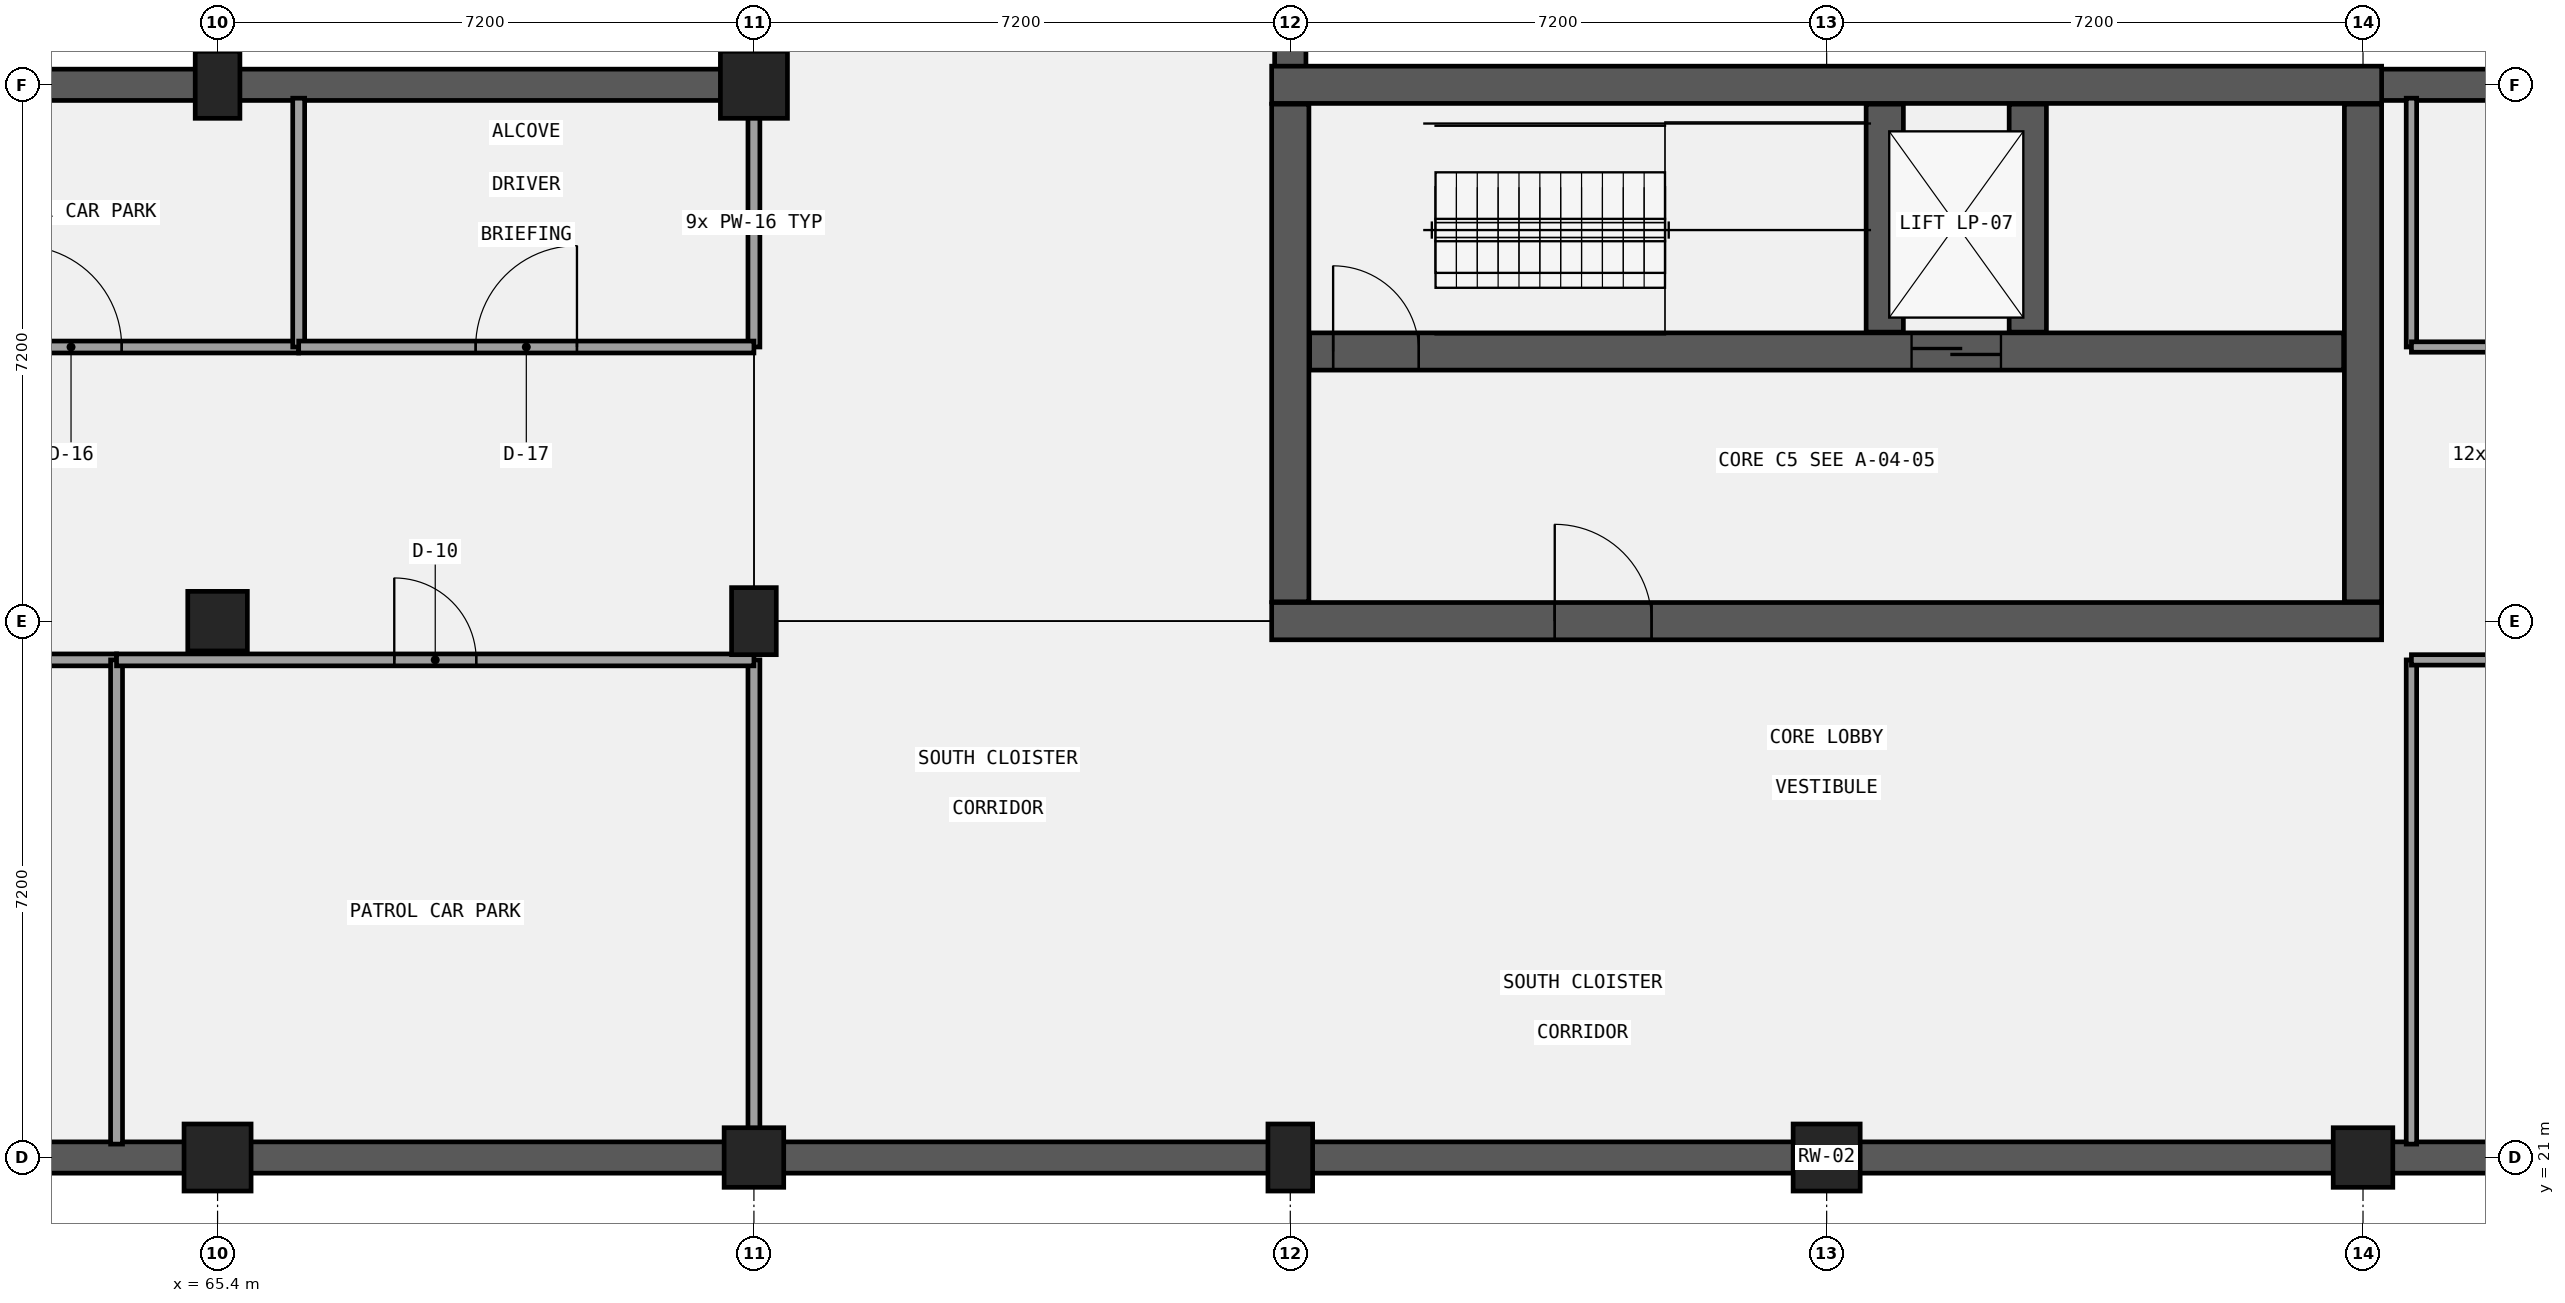
"""IFC4 building model, lengths in metres.
Left out: names, types, materials, properties, quantities, classifications, styles, units other than length and angle.
Written with IfcOpenShell. Run it as: python <this file> out.ifc"""

import sys

from ifc_helpers import new_model, si_unit, direction, frame, frame_2d, origin, origin_2d, place, context, subcontext, project, spatial, rectangle, extrude, element, fill, save


model = new_model("IFC4")
c1 = context("Model", 3, precision=1e-05, world=origin(), true_north=direction((0.0, 1.0)))
c2 = subcontext(c1, "Body", "Model", "MODEL_VIEW")
j1 = project(units=[si_unit("LENGTHUNIT", "METRE"), si_unit("PLANEANGLEUNIT", "RADIAN")], contexts=[c1])
p1 = place(None, origin())
s1 = spatial("IfcSite", under=j1, at=p1, CompositionType="ELEMENT")
p2 = place(p1, origin())
s2 = spatial("IfcBuilding", under=s1, at=p2, CompositionType="ELEMENT")
p3 = place(p2, frame((0.0, 0.0, -4.2)))
s3 = spatial("IfcBuildingStorey", under=s2, at=p3, CompositionType="ELEMENT", Elevation=-4.2)
p4 = place(p3, frame((144.81, 21.0, 0.0), z_axis=(0.0, 0.0, 1.0), x_axis=(-1.0, 0.0, 0.0)))
e1 = element("IfcWall", 1, at=p4, inside=s3, PredefinedType="USERDEFINED", context=c2, shape_type="SweptSolid", body=[
    extrude(rectangle(XDim=115.62, YDim=0.42, at=frame_2d((57.81, 0.0))), origin(), (0.0, 0.0, 1.0), 2.88),
])
p5 = place(p3, frame((29.19, 35.4, 0.0), z_axis=(0.0, 0.0, 1.0), x_axis=(1.0, 0.0, 0.0)))
e2 = element("IfcWall", 2, at=p5, inside=s3, PredefinedType="USERDEFINED", context=c2, shape_type="SweptSolid", body=[
    extrude(rectangle(XDim=43.62, YDim=0.42, at=frame_2d((21.81, 0.0))), origin(), (0.0, 0.0, 1.0), 3.03),
])
p6 = place(p3, frame((72.6, 35.6, 0.0), z_axis=(0.0, 0.0, 1.0), x_axis=(0.0, 1.0, 0.0)))
e3 = element("IfcWall", 3, at=p6, inside=s3, PredefinedType="USERDEFINED", context=c2, shape_type="SweptSolid", body=[
    extrude(rectangle(XDim=42.8, YDim=0.42, at=frame_2d((21.4, 0.0))), origin(), (0.0, 0.0, 1.0), 3.03),
])
p7 = place(p3, frame((94.43, 35.4, 0.0), z_axis=(0.0, 0.0, 1.0), x_axis=(1.0, 0.0, 0.0)))
e4 = element("IfcWall", 4, at=p7, inside=s3, PredefinedType="USERDEFINED", context=c2, shape_type="SweptSolid", body=[
    extrude(rectangle(XDim=50.38, YDim=0.42, at=frame_2d((25.19, 0.0))), origin(), (0.0, 0.0, 1.0), 2.98),
])
p8 = place(p3, frame((79.8, 78.4, 0.0), z_axis=(0.0, 0.0, 1.0), x_axis=(0.0, -1.0, 0.0)))
e5 = element("IfcWall", 5, at=p8, inside=s3, PredefinedType="USERDEFINED", context=c2, shape_type="SweptSolid", body=[
    extrude(rectangle(XDim=42.77, YDim=0.42, at=frame_2d((21.385, 0.0))), origin(), (0.0, 0.0, 1.0), 3.88),
])
p9 = place(p3, frame((79.55, 35.4, 0.0), z_axis=(0.0, 0.0, 1.0), x_axis=(1.0, 0.0, 0.0)))
e6 = element("IfcWall", 6, at=p9, inside=s3, PredefinedType="SHEAR", context=c2, shape_type="SweptSolid", body=[
    extrude(rectangle(XDim=14.9, YDim=0.5, at=frame_2d((7.45, 0.0))), origin(), (0.0, 0.0, 1.0), 4.2),
])
p10 = place(p3, frame((79.55, 28.2, 0.0), z_axis=(0.0, 0.0, 1.0), x_axis=(1.0, 0.0, 0.0)))
e7 = element("IfcWall", 7, at=p10, inside=s3, PredefinedType="SHEAR", context=c2, shape_type="SweptSolid", body=[
    extrude(rectangle(XDim=14.9, YDim=0.5, at=frame_2d((7.45, 0.0))), origin(), (0.0, 0.0, 1.0), 4.2),
])
p11 = place(p10, frame((3.8, 0.0, 0.0)))
e8 = element("IfcOpeningElement", 8, at=p11, cuts=e7, PredefinedType="OPENING", context=c2, shape_type="SweptSolid", body=[
    extrude(rectangle(XDim=1.3, YDim=2.2, at=frame_2d((0.65, 1.1))), frame((0.0, 0.26, 0.0), z_axis=(0.0, -1.0, 0.0), x_axis=(1.0, 0.0, 0.0)), (0.0, 0.0, 1.0), 0.52),
])
for number, where, z_axis, x_axis in (
    (9, (79.8, 28.46, 0.0), (0.0, 0.0, 1.0), (0.0, 1.0, 0.0)),
    (10, (94.2, 28.46, 0.0), (0.0, 0.0, 1.0), (0.0, 1.0, 0.0)),
):
    element("IfcWall", number, at=place(p3, frame(where, z_axis=z_axis, x_axis=x_axis)), inside=s3, PredefinedType="SHEAR", context=c2, shape_type="SweptSolid", body=[
        extrude(rectangle(XDim=6.68, YDim=0.5, at=frame_2d((3.34, 0.0))), origin(), (0.0, 0.0, 1.0), 4.2),
    ])
p12 = place(p3, frame((80.06, 31.82, 0.0), z_axis=(0.0, 0.0, 1.0), x_axis=(1.0, 0.0, 0.0)))
e11 = element("IfcWall", 11, at=p12, inside=s3, PredefinedType="SHEAR", context=c2, shape_type="SweptSolid", body=[
    extrude(rectangle(XDim=13.88, YDim=0.5, at=frame_2d((6.94, 0.0))), origin(), (0.0, 0.0, 1.0), 4.2),
])
p13 = place(p12, frame((8.08, 0.0, 0.0)))
e12 = element("IfcOpeningElement", 12, at=p13, cuts=e11, PredefinedType="OPENING", context=c2, shape_type="SweptSolid", body=[
    extrude(rectangle(XDim=1.2, YDim=2.15, at=frame_2d((0.6, 1.075))), frame((0.0, 0.26, 0.0), z_axis=(0.0, -1.0, 0.0), x_axis=(1.0, 0.0, 0.0)), (0.0, 0.0, 1.0), 0.52),
])
p14 = place(p12, frame((0.315, 0.0, 0.0)))
e13 = element("IfcOpeningElement", 13, at=p14, cuts=e11, PredefinedType="OPENING", context=c2, shape_type="SweptSolid", body=[
    extrude(rectangle(XDim=1.15, YDim=2.15, at=frame_2d((0.575, 1.075))), frame((0.0, 0.26, 0.0), z_axis=(0.0, -1.0, 0.0), x_axis=(1.0, 0.0, 0.0)), (0.0, 0.0, 1.0), 0.52),
])
for number, where, z_axis, x_axis in (
    (14, (87.78, 32.08, 0.0), (0.0, 0.0, 1.0), (0.0, 1.0, 0.0)),
    (15, (89.7, 32.08, 0.0), (0.0, 0.0, 1.0), (0.0, 1.0, 0.0)),
):
    element("IfcWall", number, at=place(p3, frame(where, z_axis=z_axis, x_axis=x_axis)), inside=s3, PredefinedType="SHEAR", context=c2, shape_type="SweptSolid", body=[
        extrude(rectangle(XDim=3.06, YDim=0.5, at=frame_2d((1.53, 0.0))), origin(), (0.0, 0.0, 1.0), 4.2),
    ])
p15 = place(p3, frame((65.4, 21.0, 0.0), z_axis=(0.0, 0.0, 1.0), x_axis=(1.0, 0.0, 0.0)))
e16 = element("IfcColumn", 16, at=p15, inside=s3, PredefinedType="COLUMN", context=c2, shape_type="SweptSolid", body=[
    extrude(rectangle(XDim=0.9, YDim=0.9, at=origin_2d()), origin(), (0.0, 0.0, 1.0), 4.2),
])
p16 = place(p3, frame((65.4, 28.2, 0.0), z_axis=(0.0, 0.0, 1.0), x_axis=(1.0, 0.0, 0.0)))
e17 = element("IfcColumn", 17, at=p16, inside=s3, PredefinedType="COLUMN", context=c2, shape_type="SweptSolid", body=[
    extrude(rectangle(XDim=0.8, YDim=0.8, at=origin_2d()), origin(), (0.0, 0.0, 1.0), 4.2),
])
p17 = place(p3, frame((65.4, 35.4, 0.0), z_axis=(0.0, 0.0, 1.0), x_axis=(1.0, 0.0, 0.0)))
e18 = element("IfcColumn", 18, at=p17, inside=s3, PredefinedType="COLUMN", context=c2, shape_type="SweptSolid", body=[
    extrude(rectangle(XDim=0.6, YDim=0.9, at=origin_2d()), origin(), (0.0, 0.0, 1.0), 4.2),
])
p18 = place(p3, frame((72.6, 21.0, 0.0), z_axis=(0.0, 0.0, 1.0), x_axis=(1.0, 0.0, 0.0)))
e19 = element("IfcColumn", 19, at=p18, inside=s3, PredefinedType="COLUMN", context=c2, shape_type="SweptSolid", body=[
    extrude(rectangle(XDim=0.8, YDim=0.8, at=origin_2d()), origin(), (0.0, 0.0, 1.0), 4.2),
])
p19 = place(p3, frame((72.6, 28.2, 0.0), z_axis=(0.0, 0.0, 1.0), x_axis=(1.0, 0.0, 0.0)))
e20 = element("IfcColumn", 20, at=p19, inside=s3, PredefinedType="COLUMN", context=c2, shape_type="SweptSolid", body=[
    extrude(rectangle(XDim=0.6, YDim=0.9, at=origin_2d()), origin(), (0.0, 0.0, 1.0), 4.2),
])
p20 = place(p3, frame((72.6, 35.4, 0.0), z_axis=(0.0, 0.0, 1.0), x_axis=(1.0, 0.0, 0.0)))
e21 = element("IfcColumn", 21, at=p20, inside=s3, PredefinedType="COLUMN", context=c2, shape_type="SweptSolid", body=[
    extrude(rectangle(XDim=0.9, YDim=0.9, at=origin_2d()), origin(), (0.0, 0.0, 1.0), 4.2),
])
p21 = place(p3, frame((79.8, 21.0, 0.0), z_axis=(0.0, 0.0, 1.0), x_axis=(1.0, 0.0, 0.0)))
e22 = element("IfcColumn", 22, at=p21, inside=s3, PredefinedType="COLUMN", context=c2, shape_type="SweptSolid", body=[
    extrude(rectangle(XDim=0.6, YDim=0.9, at=origin_2d()), origin(), (0.0, 0.0, 1.0), 4.2),
])
p22 = place(p3, frame((87.0, 21.0, 0.0), z_axis=(0.0, 0.0, 1.0), x_axis=(1.0, 0.0, 0.0)))
e23 = element("IfcColumn", 23, at=p22, inside=s3, PredefinedType="COLUMN", context=c2, shape_type="SweptSolid", body=[
    extrude(rectangle(XDim=0.9, YDim=0.9, at=origin_2d()), origin(), (0.0, 0.0, 1.0), 4.2),
])
p23 = place(p3, frame((94.2, 21.0, 0.0), z_axis=(0.0, 0.0, 1.0), x_axis=(1.0, 0.0, 0.0)))
e24 = element("IfcColumn", 24, at=p23, inside=s3, PredefinedType="COLUMN", context=c2, shape_type="SweptSolid", body=[
    extrude(rectangle(XDim=0.8, YDim=0.8, at=origin_2d()), origin(), (0.0, 0.0, 1.0), 4.2),
])
p24 = place(p3, frame((94.85, 21.18, 0.0), z_axis=(0.0, 0.0, 1.0), x_axis=(0.0, 1.0, 0.0)))
e25 = element("IfcWall", 25, at=p24, inside=s3, PredefinedType="PARTITIONING", context=c2, shape_type="SweptSolid", body=[
    extrude(rectangle(XDim=6.5, YDim=0.14, at=frame_2d((3.25, 0.0))), origin(), (0.0, 0.0, 1.0), 3.88),
])
p25 = place(p3, frame((94.85, 27.68, 0.0), z_axis=(0.0, 0.0, 1.0), x_axis=(1.0, 0.0, 0.0)))
e26 = element("IfcWall", 26, at=p25, inside=s3, PredefinedType="PARTITIONING", context=c2, shape_type="SweptSolid", body=[
    extrude(rectangle(XDim=9.866, YDim=0.14, at=frame_2d((4.933, 0.0))), origin(), (0.0, 0.0, 1.0), 3.88),
])
p26 = place(p25, frame((2.773, 0.0, 0.0)))
e27 = element("IfcOpeningElement", 27, at=p26, cuts=e26, PredefinedType="OPENING", context=c2, shape_type="SweptSolid", body=[
    extrude(rectangle(XDim=1.36, YDim=2.22, at=frame_2d((0.68, 1.11))), frame((0.0, 0.08, 0.0), z_axis=(0.0, -1.0, 0.0), x_axis=(1.0, 0.0, 0.0)), (0.0, 0.0, 1.0), 0.16),
])
p27 = place(p3, frame((94.85, 31.88, 0.0), z_axis=(0.0, 0.0, 1.0), x_axis=(0.0, 1.0, 0.0)))
e28 = element("IfcWall", 28, at=p27, inside=s3, PredefinedType="PARTITIONING", context=c2, shape_type="SweptSolid", body=[
    extrude(rectangle(XDim=3.34, YDim=0.14, at=frame_2d((1.67, 0.0))), origin(), (0.0, 0.0, 1.0), 3.88),
])
p28 = place(p3, frame((94.85, 31.88, 0.0), z_axis=(0.0, 0.0, 1.0), x_axis=(1.0, 0.0, 0.0)))
e29 = element("IfcWall", 29, at=p28, inside=s3, PredefinedType="PARTITIONING", context=c2, shape_type="SweptSolid", body=[
    extrude(rectangle(XDim=6.166, YDim=0.14, at=frame_2d((3.083, 0.0))), origin(), (0.0, 0.0, 1.0), 3.88),
])
p29 = place(p28, frame((2.223, 0.0, 0.0)))
e30 = element("IfcOpeningElement", 30, at=p29, cuts=e29, PredefinedType="OPENING", context=c2, shape_type="SweptSolid", body=[
    extrude(rectangle(XDim=1.72, YDim=2.1, at=frame_2d((0.86, 1.05))), frame((0.0, 0.08, 0.0), z_axis=(0.0, -1.0, 0.0), x_axis=(1.0, 0.0, 0.0)), (0.0, 0.0, 1.0), 0.16),
])
p30 = place(p3, frame((72.6, 21.18, 0.0), z_axis=(0.0, 0.0, 1.0), x_axis=(0.0, 1.0, 0.0)))
e31 = element("IfcWall", 31, at=p30, inside=s3, PredefinedType="PARTITIONING", context=c2, shape_type="SweptSolid", body=[
    extrude(rectangle(XDim=6.5, YDim=0.16, at=frame_2d((3.25, 0.0))), origin(), (0.0, 0.0, 1.0), 2.88),
])
p31 = place(p3, frame((55.488, 27.68, 0.0), z_axis=(0.0, 0.0, 1.0), x_axis=(1.0, 0.0, 0.0)))
e32 = element("IfcWall", 32, at=p31, inside=s3, PredefinedType="PARTITIONING", context=c2, shape_type="SweptSolid", body=[
    extrude(rectangle(XDim=8.556, YDim=0.16, at=frame_2d((4.278, 0.0))), origin(), (0.0, 0.0, 1.0), 3.88),
])
p32 = place(p31, frame((5.042, 0.0, 0.0)))
e33 = element("IfcOpeningElement", 33, at=p32, cuts=e32, PredefinedType="OPENING", context=c2, shape_type="SweptSolid", body=[
    extrude(rectangle(XDim=1.04, YDim=2.35, at=frame_2d((0.52, 1.175))), frame((0.0, 0.09, 0.0), z_axis=(0.0, -1.0, 0.0), x_axis=(1.0, 0.0, 0.0)), (0.0, 0.0, 1.0), 0.18),
])
p33 = place(p3, frame((64.044, 21.18, 0.0), z_axis=(0.0, 0.0, 1.0), x_axis=(0.0, 1.0, 0.0)))
e34 = element("IfcWall", 34, at=p33, inside=s3, PredefinedType="PARTITIONING", context=c2, shape_type="SweptSolid", body=[
    extrude(rectangle(XDim=6.5, YDim=0.16, at=frame_2d((3.25, 0.0))), origin(), (0.0, 0.0, 1.0), 3.88),
])
p34 = place(p3, frame((64.044, 27.68, 0.0), z_axis=(0.0, 0.0, 1.0), x_axis=(1.0, 0.0, 0.0)))
e35 = element("IfcWall", 35, at=p34, inside=s3, PredefinedType="PARTITIONING", context=c2, shape_type="SweptSolid", body=[
    extrude(rectangle(XDim=8.556, YDim=0.16, at=frame_2d((4.278, 0.0))), origin(), (0.0, 0.0, 1.0), 3.88),
])
p35 = place(p34, frame((3.728, 0.0, 0.0)))
e36 = element("IfcOpeningElement", 36, at=p35, cuts=e35, PredefinedType="OPENING", context=c2, shape_type="SweptSolid", body=[
    extrude(rectangle(XDim=1.1, YDim=2.1, at=frame_2d((0.55, 1.05))), frame((0.0, 0.09, 0.0), z_axis=(0.0, -1.0, 0.0), x_axis=(1.0, 0.0, 0.0)), (0.0, 0.0, 1.0), 0.18),
])
p36 = place(p3, frame((72.6, 31.88, 0.0), z_axis=(0.0, 0.0, 1.0), x_axis=(0.0, 1.0, 0.0)))
e37 = element("IfcWall", 37, at=p36, inside=s3, PredefinedType="PARTITIONING", context=c2, shape_type="SweptSolid", body=[
    extrude(rectangle(XDim=3.34, YDim=0.16, at=frame_2d((1.67, 0.0))), origin(), (0.0, 0.0, 1.0), 3.33),
])
p37 = place(p3, frame((60.377, 31.88, 0.0), z_axis=(0.0, 0.0, 1.0), x_axis=(1.0, 0.0, 0.0)))
e38 = element("IfcWall", 38, at=p37, inside=s3, PredefinedType="PARTITIONING", context=c2, shape_type="SweptSolid", body=[
    extrude(rectangle(XDim=6.112, YDim=0.16, at=frame_2d((3.056, 0.0))), origin(), (0.0, 0.0, 1.0), 3.33),
])
p38 = place(p37, frame((2.376, 0.0, 0.0)))
e39 = element("IfcOpeningElement", 39, at=p38, cuts=e38, PredefinedType="OPENING", context=c2, shape_type="SweptSolid", body=[
    extrude(rectangle(XDim=1.36, YDim=2.1, at=frame_2d((0.68, 1.05))), frame((0.0, 0.09, 0.0), z_axis=(0.0, -1.0, 0.0), x_axis=(1.0, 0.0, 0.0)), (0.0, 0.0, 1.0), 0.18),
])
p39 = place(p3, frame((66.489, 31.88, 0.0), z_axis=(0.0, 0.0, 1.0), x_axis=(0.0, 1.0, 0.0)))
e40 = element("IfcWall", 40, at=p39, inside=s3, PredefinedType="PARTITIONING", context=c2, shape_type="SweptSolid", body=[
    extrude(rectangle(XDim=3.34, YDim=0.16, at=frame_2d((1.67, 0.0))), origin(), (0.0, 0.0, 1.0), 3.88),
])
p40 = place(p3, frame((66.489, 31.88, 0.0), z_axis=(0.0, 0.0, 1.0), x_axis=(1.0, 0.0, 0.0)))
e41 = element("IfcWall", 41, at=p40, inside=s3, PredefinedType="PARTITIONING", context=c2, shape_type="SweptSolid", body=[
    extrude(rectangle(XDim=6.111, YDim=0.16, at=frame_2d((3.056, 0.0))), origin(), (0.0, 0.0, 1.0), 3.33),
])
p41 = place(p40, frame((2.375, 0.0, 0.0)))
e42 = element("IfcOpeningElement", 42, at=p41, cuts=e41, PredefinedType="OPENING", context=c2, shape_type="SweptSolid", body=[
    extrude(rectangle(XDim=1.36, YDim=2.22, at=frame_2d((0.68, 1.11))), frame((0.0, 0.09, 0.0), z_axis=(0.0, -1.0, 0.0), x_axis=(1.0, 0.0, 0.0)), (0.0, 0.0, 1.0), 0.18),
])
p42 = place(p13, frame((1.2, 0.0, 0.0), z_axis=(0.0, 0.0, 1.0), x_axis=(-1.0, 0.0, 0.0)))
e43 = element("IfcDoor", 43, at=p42, inside=s3, OperationType="DOUBLE_DOOR_SLIDING", PredefinedType="DOOR", context=c2, shape_type="SweptSolid", body=[
    extrude(rectangle(XDim=1.2, YDim=2.15, at=frame_2d((0.6, 1.075))), frame((0.0, 0.025, 0.0), z_axis=(0.0, -1.0, 0.0), x_axis=(1.0, 0.0, 0.0)), (0.0, 0.0, 1.0), 0.05),
])
fill(e12, e43)
p43 = place(p14, origin())
e44 = element("IfcDoor", 44, at=p43, inside=s3, OperationType="SINGLE_SWING_LEFT", PredefinedType="DOOR", context=c2, shape_type="SweptSolid", body=[
    extrude(rectangle(XDim=1.15, YDim=2.15, at=frame_2d((0.575, 1.075))), frame((0.0, 0.025, 0.0), z_axis=(0.0, -1.0, 0.0), x_axis=(1.0, 0.0, 0.0)), (0.0, 0.0, 1.0), 0.05),
])
fill(e13, e44)
p44 = place(p11, frame((1.3, 0.0, 0.0), z_axis=(0.0, 0.0, 1.0), x_axis=(-1.0, 0.0, 0.0)))
e45 = element("IfcDoor", 45, at=p44, inside=s3, OperationType="SINGLE_SWING_LEFT", PredefinedType="DOOR", context=c2, shape_type="SweptSolid", body=[
    extrude(rectangle(XDim=1.3, YDim=2.2, at=frame_2d((0.65, 1.1))), frame((0.0, 0.025, 0.0), z_axis=(0.0, -1.0, 0.0), x_axis=(1.0, 0.0, 0.0)), (0.0, 0.0, 1.0), 0.05),
])
fill(e8, e45)
p45 = place(p35, frame((1.1, 0.0, 0.0), z_axis=(0.0, 0.0, 1.0), x_axis=(-1.0, 0.0, 0.0)))
e46 = element("IfcDoor", 46, at=p45, inside=s3, OperationType="SINGLE_SWING_LEFT", PredefinedType="DOOR", context=c2, shape_type="SweptSolid", body=[
    extrude(rectangle(XDim=1.1, YDim=2.1, at=frame_2d((0.55, 1.05))), frame((0.0, 0.025, 0.0), z_axis=(0.0, -1.0, 0.0), x_axis=(1.0, 0.0, 0.0)), (0.0, 0.0, 1.0), 0.05),
])
fill(e36, e46)
p46 = place(p38, origin())
e47 = element("IfcDoor", 47, at=p46, inside=s3, OperationType="SINGLE_SWING_LEFT", PredefinedType="DOOR", context=c2, shape_type="SweptSolid", body=[
    extrude(rectangle(XDim=1.36, YDim=2.1, at=frame_2d((0.68, 1.05))), frame((0.0, 0.025, 0.0), z_axis=(0.0, -1.0, 0.0), x_axis=(1.0, 0.0, 0.0)), (0.0, 0.0, 1.0), 0.05),
])
fill(e39, e47)
p47 = place(p41, origin())
e48 = element("IfcDoor", 48, at=p47, inside=s3, OperationType="SINGLE_SWING_RIGHT", PredefinedType="DOOR", context=c2, shape_type="SweptSolid", body=[
    extrude(rectangle(XDim=1.36, YDim=2.22, at=frame_2d((0.68, 1.11))), frame((0.0, 0.025, 0.0), z_axis=(0.0, -1.0, 0.0), x_axis=(1.0, 0.0, 0.0)), (0.0, 0.0, 1.0), 0.05),
])
fill(e42, e48)
save(model, sys.argv[1])
